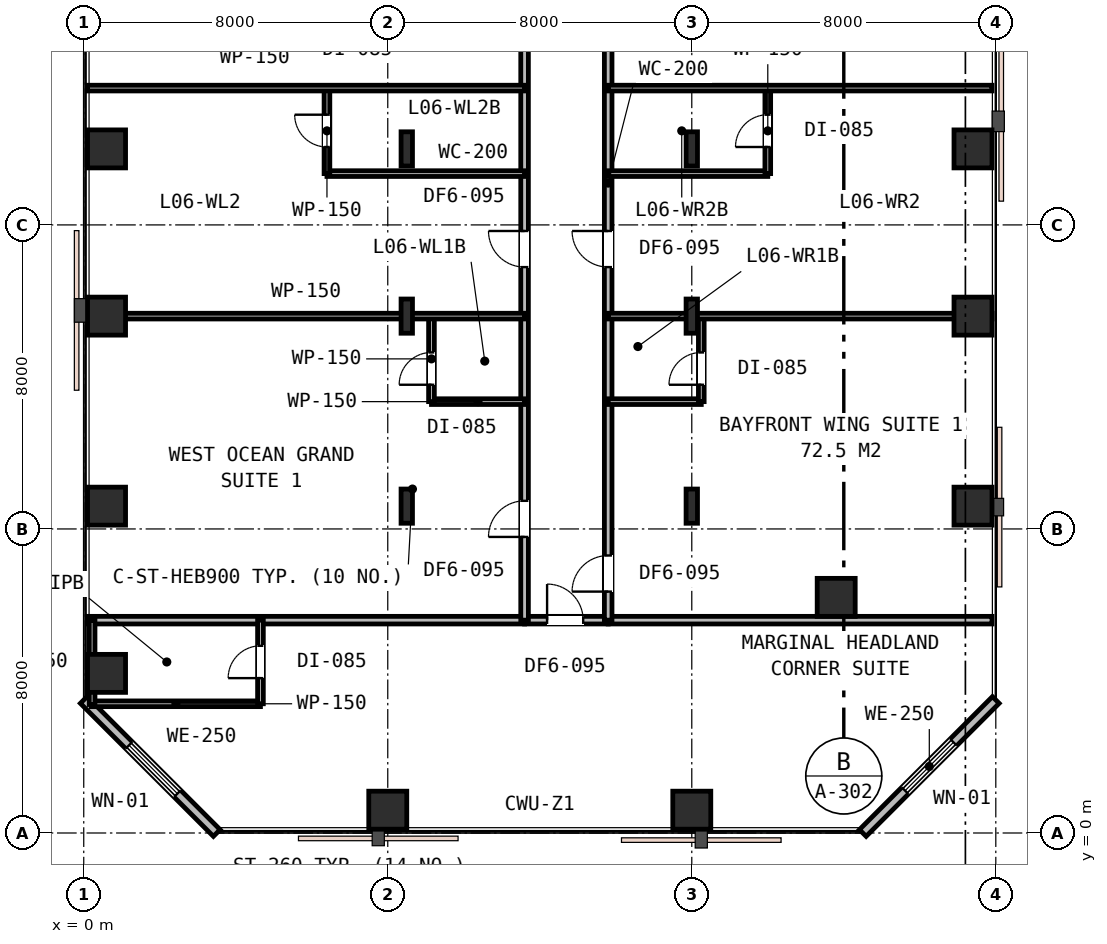
"""IFC4 building model, lengths in metres.
Left out: names, types, materials, properties, quantities, classifications, styles, units other than length and angle.
Written with IfcOpenShell. Run it as: python <this file> out.ifc"""

import sys

from ifc_helpers import new_model, si_unit, direction, frame, frame_2d, origin, origin_2d, place, context, subcontext, project, spatial, rectangle, i_section, extrude, element, fill, save


model = new_model("IFC4")
c1 = context("Model", 3, precision=1e-05, world=origin(), true_north=direction((0.0, 1.0)))
c2 = subcontext(c1, "Body", "Model", "MODEL_VIEW")
j1 = project(units=[si_unit("LENGTHUNIT", "METRE"), si_unit("PLANEANGLEUNIT", "RADIAN")], contexts=[c1])
p1 = place(None, origin())
s1 = spatial("IfcSite", under=j1, at=p1, CompositionType="ELEMENT")
p2 = place(p1, origin())
s2 = spatial("IfcBuilding", under=s1, at=p2, CompositionType="ELEMENT")
p3 = place(p2, frame((0.0, 0.0, 29.4)))
s3 = spatial("IfcBuildingStorey", under=s2, at=p3, CompositionType="ELEMENT", Elevation=29.4)
for number, where, z_axis, x_axis in (
    (1, (0.6, 8.6, 0.0), (0.0, 0.0, 1.0), (1.0, 0.0, 0.0)),
    (2, (0.6, 13.6, 0.0), (0.0, 0.0, 1.0), (1.0, 0.0, 0.0)),
    (3, (0.6, 18.0, 0.0), (0.0, 0.0, 1.0), (1.0, 0.0, 0.0)),
    (4, (0.6, 4.2, 0.0), (0.0, 0.0, 1.0), (1.0, 0.0, 0.0)),
    (5, (8.0, 0.6, 0.0), (0.0, 0.0, 1.0), (1.0, 0.0, 0.0)),
    (6, (16.0, 0.6, 0.0), (0.0, 0.0, 1.0), (1.0, 0.0, 0.0)),
    (7, (19.8, 6.2, 0.0), (0.0, 0.0, 1.0), (1.0, 0.0, 0.0)),
    (8, (23.4, 8.6, 0.0), (0.0, 0.0, 1.0), (1.0, 0.0, 0.0)),
    (9, (23.4, 13.6, 0.0), (0.0, 0.0, 1.0), (1.0, 0.0, 0.0)),
    (10, (23.4, 18.0, 0.0), (0.0, 0.0, 1.0), (1.0, 0.0, 0.0)),
):
    element("IfcColumn", number, at=place(p3, frame(where, z_axis=z_axis, x_axis=x_axis)), inside=s3, PredefinedType="COLUMN", context=c2, shape_type="SweptSolid", body=[
        extrude(rectangle(XDim=1.0, YDim=1.0, at=origin_2d()), origin(), (0.0, 0.0, 1.0), 3.6),
    ])
for number, where, z_axis, x_axis in (
    (11, (8.5, 8.6, 0.0), (0.0, 0.0, 1.0), (1.0, 0.0, 0.0)),
    (12, (16.0, 8.6, 0.0), (0.0, 0.0, 1.0), (1.0, 0.0, 0.0)),
    (13, (8.5, 13.6, 0.0), (0.0, 0.0, 1.0), (1.0, 0.0, 0.0)),
    (14, (16.0, 13.6, 0.0), (0.0, 0.0, 1.0), (1.0, 0.0, 0.0)),
    (15, (8.5, 18.0, 0.0), (0.0, 0.0, 1.0), (1.0, 0.0, 0.0)),
    (16, (16.0, 18.0, 0.0), (0.0, 0.0, 1.0), (1.0, 0.0, 0.0)),
):
    element("IfcColumn", number, at=place(p3, frame(where, z_axis=z_axis, x_axis=x_axis)), inside=s3, PredefinedType="COLUMN", context=c2, shape_type="SweptSolid", body=[
        extrude(i_section(OverallWidth=0.3, OverallDepth=0.9, WebThickness=0.018, FlangeThickness=0.035, FilletRadius=0.03, at=origin_2d()), origin(), (0.0, 0.0, 1.0), 3.6),
    ])
p4 = place(p3, frame((20.5, 0.0, 0.0), z_axis=(0.0, 0.0, 1.0), x_axis=(0.707106781187, 0.707106781187, 0.0)))
e17 = element("IfcWall", 17, at=p4, inside=s3, PredefinedType="STANDARD", context=c2, shape_type="SweptSolid", body=[
    extrude(rectangle(XDim=4.95, YDim=0.25, at=frame_2d((2.475, 0.0))), origin(), (0.0, 0.0, 1.0), 3.33),
])
p5 = place(p4, frame((1.575, 0.0, 0.75)))
e18 = element("IfcOpeningElement", 18, at=p5, cuts=e17, PredefinedType="OPENING", context=c2, shape_type="SweptSolid", body=[
    extrude(rectangle(XDim=1.8, YDim=1.85, at=frame_2d((0.9, 0.925))), frame((0.0, 0.135, 0.0), z_axis=(0.0, -1.0, 0.0), x_axis=(1.0, 0.0, 0.0)), (0.0, 0.0, 1.0), 0.27),
])
p6 = place(p3, frame((0.0, 3.5, 0.0), z_axis=(0.0, 0.0, 1.0), x_axis=(0.707106781187, -0.707106781187, 0.0)))
e19 = element("IfcWall", 19, at=p6, inside=s3, PredefinedType="STANDARD", context=c2, shape_type="SweptSolid", body=[
    extrude(rectangle(XDim=4.95, YDim=0.25, at=frame_2d((2.475, 0.0))), origin(), (0.0, 0.0, 1.0), 3.33),
])
p7 = place(p6, frame((1.685, 0.0, 0.75)))
e20 = element("IfcOpeningElement", 20, at=p7, cuts=e19, PredefinedType="OPENING", context=c2, shape_type="SweptSolid", body=[
    extrude(rectangle(XDim=1.8, YDim=1.85, at=frame_2d((0.9, 0.925))), frame((0.0, 0.135, 0.0), z_axis=(0.0, -1.0, 0.0), x_axis=(1.0, 0.0, 0.0)), (0.0, 0.0, 1.0), 0.27),
])
p8 = place(p3, frame((0.1, 5.6, 0.0), z_axis=(0.0, 0.0, 1.0), x_axis=(1.0, 0.0, 0.0)))
e21 = element("IfcWall", 21, at=p8, inside=s3, PredefinedType="PARTITIONING", context=c2, shape_type="SweptSolid", body=[
    extrude(rectangle(XDim=11.5, YDim=0.2, at=frame_2d((5.75, 0.0))), origin(), (0.0, 0.0, 1.0), 2.87),
])
p9 = place(p3, frame((13.8, 5.6, 0.0), z_axis=(0.0, 0.0, 1.0), x_axis=(1.0, 0.0, 0.0)))
e22 = element("IfcWall", 22, at=p9, inside=s3, PredefinedType="PARTITIONING", context=c2, shape_type="SweptSolid", body=[
    extrude(rectangle(XDim=10.1, YDim=0.2, at=frame_2d((5.05, 0.0))), origin(), (0.0, 0.0, 1.0), 2.68),
])
p10 = place(p3, frame((11.6, 5.6, 0.0), z_axis=(0.0, 0.0, 1.0), x_axis=(1.0, 0.0, 0.0)))
e23 = element("IfcWall", 23, at=p10, inside=s3, PredefinedType="PARTITIONING", context=c2, shape_type="SweptSolid", body=[
    extrude(rectangle(XDim=2.2, YDim=0.2, at=frame_2d((1.1, 0.0))), origin(), (0.0, 0.0, 1.0), 3.33),
])
p11 = place(p10, frame((0.593, 0.0, 0.0)))
e24 = element("IfcOpeningElement", 24, at=p11, cuts=e23, PredefinedType="OPENING", context=c2, shape_type="SweptSolid", body=[
    extrude(rectangle(XDim=0.95, YDim=2.15, at=frame_2d((0.475, 1.075))), frame((0.0, 0.11, 0.0), z_axis=(0.0, -1.0, 0.0), x_axis=(1.0, 0.0, 0.0)), (0.0, 0.0, 1.0), 0.22),
])
p12 = place(p3, frame((0.2, 3.4, 0.0), z_axis=(0.0, 0.0, 1.0), x_axis=(1.0, 0.0, 0.0)))
e25 = element("IfcWall", 25, at=p12, inside=s3, PredefinedType="PARTITIONING", context=c2, shape_type="SweptSolid", body=[
    extrude(rectangle(XDim=4.45, YDim=0.15, at=frame_2d((2.225, 0.0))), origin(), (0.0, 0.0, 1.0), 3.33),
])
p13 = place(p3, frame((4.65, 3.4, 0.0), z_axis=(0.0, 0.0, 1.0), x_axis=(0.0, 1.0, 0.0)))
e26 = element("IfcWall", 26, at=p13, inside=s3, PredefinedType="PARTITIONING", context=c2, shape_type="SweptSolid", body=[
    extrude(rectangle(XDim=2.2, YDim=0.15, at=frame_2d((1.1, 0.0))), origin(), (0.0, 0.0, 1.0), 3.33),
])
p14 = place(p13, frame((0.675, 0.0, 0.0)))
e27 = element("IfcOpeningElement", 27, at=p14, cuts=e26, PredefinedType="OPENING", context=c2, shape_type="SweptSolid", body=[
    extrude(rectangle(XDim=0.85, YDim=2.15, at=frame_2d((0.425, 1.075))), frame((0.0, 0.085, 0.0), z_axis=(0.0, -1.0, 0.0), x_axis=(1.0, 0.0, 0.0)), (0.0, 0.0, 1.0), 0.17),
])
p15 = place(p3, frame((0.22, 3.38, 0.0), z_axis=(0.0, 0.0, 1.0), x_axis=(0.0, 1.0, 0.0)))
e28 = element("IfcWall", 28, at=p15, inside=s3, PredefinedType="PARTITIONING", context=c2, shape_type="SweptSolid", body=[
    extrude(rectangle(XDim=2.22, YDim=0.15, at=frame_2d((1.11, 0.0))), origin(), (0.0, 0.0, 1.0), 2.87),
])
p16 = place(p3, frame((11.6, 5.6, 0.0), z_axis=(0.0, 0.0, 1.0), x_axis=(0.0, 1.0, 0.0)))
e29 = element("IfcWall", 29, at=p16, inside=s3, PredefinedType="PARTITIONING", context=c2, shape_type="SweptSolid", body=[
    extrude(rectangle(XDim=23.0, YDim=0.2, at=frame_2d((11.5, 0.0))), origin(), (0.0, 0.0, 1.0), 2.68),
])
p17 = place(p16, frame((2.19, 0.0, 0.0)))
e30 = element("IfcOpeningElement", 30, at=p17, cuts=e29, PredefinedType="OPENING", context=c2, shape_type="SweptSolid", body=[
    extrude(rectangle(XDim=0.95, YDim=2.15, at=frame_2d((0.475, 1.075))), frame((0.0, 0.11, 0.0), z_axis=(0.0, -1.0, 0.0), x_axis=(1.0, 0.0, 0.0)), (0.0, 0.0, 1.0), 0.22),
])
p18 = place(p16, frame((9.29, 0.0, 0.0)))
e31 = element("IfcOpeningElement", 31, at=p18, cuts=e29, PredefinedType="OPENING", context=c2, shape_type="SweptSolid", body=[
    extrude(rectangle(XDim=0.95, YDim=2.15, at=frame_2d((0.475, 1.075))), frame((0.0, 0.11, 0.0), z_axis=(0.0, -1.0, 0.0), x_axis=(1.0, 0.0, 0.0)), (0.0, 0.0, 1.0), 0.22),
])
p19 = place(p16, frame((16.64, 0.0, 0.0)))
e32 = element("IfcOpeningElement", 32, at=p19, cuts=e29, PredefinedType="OPENING", context=c2, shape_type="SweptSolid", body=[
    extrude(rectangle(XDim=0.95, YDim=2.15, at=frame_2d((0.475, 1.075))), frame((0.0, 0.11, 0.0), z_axis=(0.0, -1.0, 0.0), x_axis=(1.0, 0.0, 0.0)), (0.0, 0.0, 1.0), 0.22),
])
p20 = place(p3, frame((9.15, 11.35, 0.0), z_axis=(0.0, 0.0, 1.0), x_axis=(1.0, 0.0, 0.0)))
e33 = element("IfcWall", 33, at=p20, inside=s3, PredefinedType="PARTITIONING", context=c2, shape_type="SweptSolid", body=[
    extrude(rectangle(XDim=2.45, YDim=0.15, at=frame_2d((1.225, 0.0))), origin(), (0.0, 0.0, 1.0), 2.92),
])
p21 = place(p3, frame((9.15, 11.35, 0.0), z_axis=(0.0, 0.0, 1.0), x_axis=(0.0, 1.0, 0.0)))
e34 = element("IfcWall", 34, at=p21, inside=s3, PredefinedType="PARTITIONING", context=c2, shape_type="SweptSolid", body=[
    extrude(rectangle(XDim=2.25, YDim=0.15, at=frame_2d((1.125, 0.0))), origin(), (0.0, 0.0, 1.0), 2.68),
])
p22 = place(p21, frame((0.444, 0.0, 0.0)))
e35 = element("IfcOpeningElement", 35, at=p22, cuts=e34, PredefinedType="OPENING", context=c2, shape_type="SweptSolid", body=[
    extrude(rectangle(XDim=0.85, YDim=2.15, at=frame_2d((0.425, 1.075))), frame((0.0, 0.085, 0.0), z_axis=(0.0, -1.0, 0.0), x_axis=(1.0, 0.0, 0.0)), (0.0, 0.0, 1.0), 0.17),
])
p23 = place(p3, frame((0.1, 13.6, 0.0), z_axis=(0.0, 0.0, 1.0), x_axis=(1.0, 0.0, 0.0)))
e36 = element("IfcWall", 36, at=p23, inside=s3, PredefinedType="PARTITIONING", context=c2, shape_type="SweptSolid", body=[
    extrude(rectangle(XDim=11.5, YDim=0.15, at=frame_2d((5.75, 0.0))), origin(), (0.0, 0.0, 1.0), 2.68),
])
p24 = place(p3, frame((13.8, 5.6, 0.0), z_axis=(0.0, 0.0, 1.0), x_axis=(0.0, 1.0, 0.0)))
e37 = element("IfcWall", 37, at=p24, inside=s3, PredefinedType="PARTITIONING", context=c2, shape_type="SweptSolid", body=[
    extrude(rectangle(XDim=23.0, YDim=0.2, at=frame_2d((11.5, 0.0))), origin(), (0.0, 0.0, 1.0), 2.68),
])
p25 = place(p24, frame((0.752, 0.0, 0.0)))
e38 = element("IfcOpeningElement", 38, at=p25, cuts=e37, PredefinedType="OPENING", context=c2, shape_type="SweptSolid", body=[
    extrude(rectangle(XDim=0.95, YDim=2.15, at=frame_2d((0.475, 1.075))), frame((0.0, 0.11, 0.0), z_axis=(0.0, -1.0, 0.0), x_axis=(1.0, 0.0, 0.0)), (0.0, 0.0, 1.0), 0.22),
])
p26 = place(p24, frame((9.29, 0.0, 0.0)))
e39 = element("IfcOpeningElement", 39, at=p26, cuts=e37, PredefinedType="OPENING", context=c2, shape_type="SweptSolid", body=[
    extrude(rectangle(XDim=0.95, YDim=2.15, at=frame_2d((0.475, 1.075))), frame((0.0, 0.11, 0.0), z_axis=(0.0, -1.0, 0.0), x_axis=(1.0, 0.0, 0.0)), (0.0, 0.0, 1.0), 0.22),
])
p27 = place(p24, frame((16.494, 0.0, 0.0)))
e40 = element("IfcOpeningElement", 40, at=p27, cuts=e37, PredefinedType="OPENING", context=c2, shape_type="SweptSolid", body=[
    extrude(rectangle(XDim=0.95, YDim=2.15, at=frame_2d((0.475, 1.075))), frame((0.0, 0.11, 0.0), z_axis=(0.0, -1.0, 0.0), x_axis=(1.0, 0.0, 0.0)), (0.0, 0.0, 1.0), 0.22),
])
p28 = place(p3, frame((13.8, 11.35, 0.0), z_axis=(0.0, 0.0, 1.0), x_axis=(1.0, 0.0, 0.0)))
e41 = element("IfcWall", 41, at=p28, inside=s3, PredefinedType="PARTITIONING", context=c2, shape_type="SweptSolid", body=[
    extrude(rectangle(XDim=2.45, YDim=0.15, at=frame_2d((1.225, 0.0))), origin(), (0.0, 0.0, 1.0), 2.68),
])
p29 = place(p3, frame((16.25, 11.35, 0.0), z_axis=(0.0, 0.0, 1.0), x_axis=(0.0, 1.0, 0.0)))
e42 = element("IfcWall", 42, at=p29, inside=s3, PredefinedType="PARTITIONING", context=c2, shape_type="SweptSolid", body=[
    extrude(rectangle(XDim=2.25, YDim=0.15, at=frame_2d((1.125, 0.0))), origin(), (0.0, 0.0, 1.0), 2.68),
])
p30 = place(p29, frame((0.444, 0.0, 0.0)))
e43 = element("IfcOpeningElement", 43, at=p30, cuts=e42, PredefinedType="OPENING", context=c2, shape_type="SweptSolid", body=[
    extrude(rectangle(XDim=0.85, YDim=2.15, at=frame_2d((0.425, 1.075))), frame((0.0, 0.085, 0.0), z_axis=(0.0, -1.0, 0.0), x_axis=(1.0, 0.0, 0.0)), (0.0, 0.0, 1.0), 0.17),
])
p31 = place(p3, frame((13.8, 13.6, 0.0), z_axis=(0.0, 0.0, 1.0), x_axis=(1.0, 0.0, 0.0)))
e44 = element("IfcWall", 44, at=p31, inside=s3, PredefinedType="PARTITIONING", context=c2, shape_type="SweptSolid", body=[
    extrude(rectangle(XDim=10.1, YDim=0.15, at=frame_2d((5.05, 0.0))), origin(), (0.0, 0.0, 1.0), 2.68),
])
p32 = place(p3, frame((6.4, 17.35, 0.0), z_axis=(0.0, 0.0, 1.0), x_axis=(1.0, 0.0, 0.0)))
e45 = element("IfcWall", 45, at=p32, inside=s3, PredefinedType="PARTITIONING", context=c2, shape_type="SweptSolid", body=[
    extrude(rectangle(XDim=5.2, YDim=0.15, at=frame_2d((2.6, 0.0))), origin(), (0.0, 0.0, 1.0), 2.68),
])
p33 = place(p3, frame((6.4, 17.35, 0.0), z_axis=(0.0, 0.0, 1.0), x_axis=(0.0, 1.0, 0.0)))
e46 = element("IfcWall", 46, at=p33, inside=s3, PredefinedType="PARTITIONING", context=c2, shape_type="SweptSolid", body=[
    extrude(rectangle(XDim=2.25, YDim=0.15, at=frame_2d((1.125, 0.0))), origin(), (0.0, 0.0, 1.0), 2.68),
])
p34 = place(p33, frame((0.7, 0.0, 0.0)))
e47 = element("IfcOpeningElement", 47, at=p34, cuts=e46, PredefinedType="OPENING", context=c2, shape_type="SweptSolid", body=[
    extrude(rectangle(XDim=0.85, YDim=2.15, at=frame_2d((0.425, 1.075))), frame((0.0, 0.085, 0.0), z_axis=(0.0, -1.0, 0.0), x_axis=(1.0, 0.0, 0.0)), (0.0, 0.0, 1.0), 0.17),
])
p35 = place(p3, frame((0.1, 19.6, 0.0), z_axis=(0.0, 0.0, 1.0), x_axis=(1.0, 0.0, 0.0)))
e48 = element("IfcWall", 48, at=p35, inside=s3, PredefinedType="PARTITIONING", context=c2, shape_type="SweptSolid", body=[
    extrude(rectangle(XDim=11.5, YDim=0.15, at=frame_2d((5.75, 0.0))), origin(), (0.0, 0.0, 1.0), 2.68),
])
p36 = place(p3, frame((13.8, 17.35, 0.0), z_axis=(0.0, 0.0, 1.0), x_axis=(1.0, 0.0, 0.0)))
e49 = element("IfcWall", 49, at=p36, inside=s3, PredefinedType="PARTITIONING", context=c2, shape_type="SweptSolid", body=[
    extrude(rectangle(XDim=4.2, YDim=0.15, at=frame_2d((2.1, 0.0))), origin(), (0.0, 0.0, 1.0), 2.68),
])
p37 = place(p3, frame((18.0, 17.35, 0.0), z_axis=(0.0, 0.0, 1.0), x_axis=(0.0, 1.0, 0.0)))
e50 = element("IfcWall", 50, at=p37, inside=s3, PredefinedType="PARTITIONING", context=c2, shape_type="SweptSolid", body=[
    extrude(rectangle(XDim=2.25, YDim=0.15, at=frame_2d((1.125, 0.0))), origin(), (0.0, 0.0, 1.0), 2.68),
])
p38 = place(p37, frame((0.7, 0.0, 0.0)))
e51 = element("IfcOpeningElement", 51, at=p38, cuts=e50, PredefinedType="OPENING", context=c2, shape_type="SweptSolid", body=[
    extrude(rectangle(XDim=0.85, YDim=2.15, at=frame_2d((0.425, 1.075))), frame((0.0, 0.085, 0.0), z_axis=(0.0, -1.0, 0.0), x_axis=(1.0, 0.0, 0.0)), (0.0, 0.0, 1.0), 0.17),
])
p39 = place(p3, frame((13.8, 19.6, 0.0), z_axis=(0.0, 0.0, 1.0), x_axis=(1.0, 0.0, 0.0)))
e52 = element("IfcWall", 52, at=p39, inside=s3, PredefinedType="PARTITIONING", context=c2, shape_type="SweptSolid", body=[
    extrude(rectangle(XDim=10.1, YDim=0.15, at=frame_2d((5.05, 0.0))), origin(), (0.0, 0.0, 1.0), 2.68),
])
p40 = place(p5, origin())
e53 = element("IfcWindow", 53, at=p40, inside=s3, PartitioningType="SINGLE_PANEL", PredefinedType="WINDOW", context=c2, shape_type="SweptSolid", body=[
    extrude(rectangle(XDim=1.8, YDim=1.85, at=frame_2d((0.9, 0.925))), frame((0.0, 0.03, 0.0), z_axis=(0.0, -1.0, 0.0), x_axis=(1.0, 0.0, 0.0)), (0.0, 0.0, 1.0), 0.06),
])
fill(e18, e53)
p41 = place(p7, origin())
e54 = element("IfcWindow", 54, at=p41, inside=s3, PartitioningType="SINGLE_PANEL", PredefinedType="WINDOW", context=c2, shape_type="SweptSolid", body=[
    extrude(rectangle(XDim=1.8, YDim=1.85, at=frame_2d((0.9, 0.925))), frame((0.0, 0.03, 0.0), z_axis=(0.0, -1.0, 0.0), x_axis=(1.0, 0.0, 0.0)), (0.0, 0.0, 1.0), 0.06),
])
fill(e20, e54)
p42 = place(p11, origin())
e55 = element("IfcDoor", 55, at=p42, inside=s3, OperationType="SINGLE_SWING_LEFT", PredefinedType="DOOR", context=c2, shape_type="SweptSolid", body=[
    extrude(rectangle(XDim=0.95, YDim=2.15, at=frame_2d((0.475, 1.075))), frame((0.0, 0.025, 0.0), z_axis=(0.0, -1.0, 0.0), x_axis=(1.0, 0.0, 0.0)), (0.0, 0.0, 1.0), 0.05),
])
fill(e24, e55)
p43 = place(p14, origin())
e56 = element("IfcDoor", 56, at=p43, inside=s3, OperationType="SINGLE_SWING_LEFT", PredefinedType="DOOR", context=c2, shape_type="SweptSolid", body=[
    extrude(rectangle(XDim=0.85, YDim=2.15, at=frame_2d((0.425, 1.075))), frame((0.0, 0.025, 0.0), z_axis=(0.0, -1.0, 0.0), x_axis=(1.0, 0.0, 0.0)), (0.0, 0.0, 1.0), 0.05),
])
fill(e27, e56)
p44 = place(p17, origin())
e57 = element("IfcDoor", 57, at=p44, inside=s3, OperationType="SINGLE_SWING_LEFT", PredefinedType="DOOR", context=c2, shape_type="SweptSolid", body=[
    extrude(rectangle(XDim=0.95, YDim=2.15, at=frame_2d((0.475, 1.075))), frame((0.0, 0.025, 0.0), z_axis=(0.0, -1.0, 0.0), x_axis=(1.0, 0.0, 0.0)), (0.0, 0.0, 1.0), 0.05),
])
fill(e30, e57)
p45 = place(p22, origin())
e58 = element("IfcDoor", 58, at=p45, inside=s3, OperationType="SINGLE_SWING_LEFT", PredefinedType="DOOR", context=c2, shape_type="SweptSolid", body=[
    extrude(rectangle(XDim=0.85, YDim=2.15, at=frame_2d((0.425, 1.075))), frame((0.0, 0.025, 0.0), z_axis=(0.0, -1.0, 0.0), x_axis=(1.0, 0.0, 0.0)), (0.0, 0.0, 1.0), 0.05),
])
fill(e35, e58)
p46 = place(p25, origin())
e59 = element("IfcDoor", 59, at=p46, inside=s3, OperationType="SINGLE_SWING_LEFT", PredefinedType="DOOR", context=c2, shape_type="SweptSolid", body=[
    extrude(rectangle(XDim=0.95, YDim=2.15, at=frame_2d((0.475, 1.075))), frame((0.0, 0.025, 0.0), z_axis=(0.0, -1.0, 0.0), x_axis=(1.0, 0.0, 0.0)), (0.0, 0.0, 1.0), 0.05),
])
fill(e38, e59)
p47 = place(p30, origin())
e60 = element("IfcDoor", 60, at=p47, inside=s3, OperationType="SINGLE_SWING_LEFT", PredefinedType="DOOR", context=c2, shape_type="SweptSolid", body=[
    extrude(rectangle(XDim=0.85, YDim=2.15, at=frame_2d((0.425, 1.075))), frame((0.0, 0.025, 0.0), z_axis=(0.0, -1.0, 0.0), x_axis=(1.0, 0.0, 0.0)), (0.0, 0.0, 1.0), 0.05),
])
fill(e43, e60)
p48 = place(p18, origin())
e61 = element("IfcDoor", 61, at=p48, inside=s3, OperationType="SINGLE_SWING_RIGHT", PredefinedType="DOOR", context=c2, shape_type="SweptSolid", body=[
    extrude(rectangle(XDim=0.95, YDim=2.15, at=frame_2d((0.475, 1.075))), frame((0.0, 0.025, 0.0), z_axis=(0.0, -1.0, 0.0), x_axis=(1.0, 0.0, 0.0)), (0.0, 0.0, 1.0), 0.05),
])
fill(e31, e61)
p49 = place(p34, origin())
e62 = element("IfcDoor", 62, at=p49, inside=s3, OperationType="SINGLE_SWING_RIGHT", PredefinedType="DOOR", context=c2, shape_type="SweptSolid", body=[
    extrude(rectangle(XDim=0.85, YDim=2.15, at=frame_2d((0.425, 1.075))), frame((0.0, 0.025, 0.0), z_axis=(0.0, -1.0, 0.0), x_axis=(1.0, 0.0, 0.0)), (0.0, 0.0, 1.0), 0.05),
])
fill(e47, e62)
p50 = place(p26, origin())
e63 = element("IfcDoor", 63, at=p50, inside=s3, OperationType="SINGLE_SWING_RIGHT", PredefinedType="DOOR", context=c2, shape_type="SweptSolid", body=[
    extrude(rectangle(XDim=0.95, YDim=2.15, at=frame_2d((0.475, 1.075))), frame((0.0, 0.025, 0.0), z_axis=(0.0, -1.0, 0.0), x_axis=(1.0, 0.0, 0.0)), (0.0, 0.0, 1.0), 0.05),
])
fill(e39, e63)
p51 = place(p38, origin())
e64 = element("IfcDoor", 64, at=p51, inside=s3, OperationType="SINGLE_SWING_LEFT", PredefinedType="DOOR", context=c2, shape_type="SweptSolid", body=[
    extrude(rectangle(XDim=0.85, YDim=2.15, at=frame_2d((0.425, 1.075))), frame((0.0, 0.025, 0.0), z_axis=(0.0, -1.0, 0.0), x_axis=(1.0, 0.0, 0.0)), (0.0, 0.0, 1.0), 0.05),
])
fill(e51, e64)
save(model, sys.argv[1])
